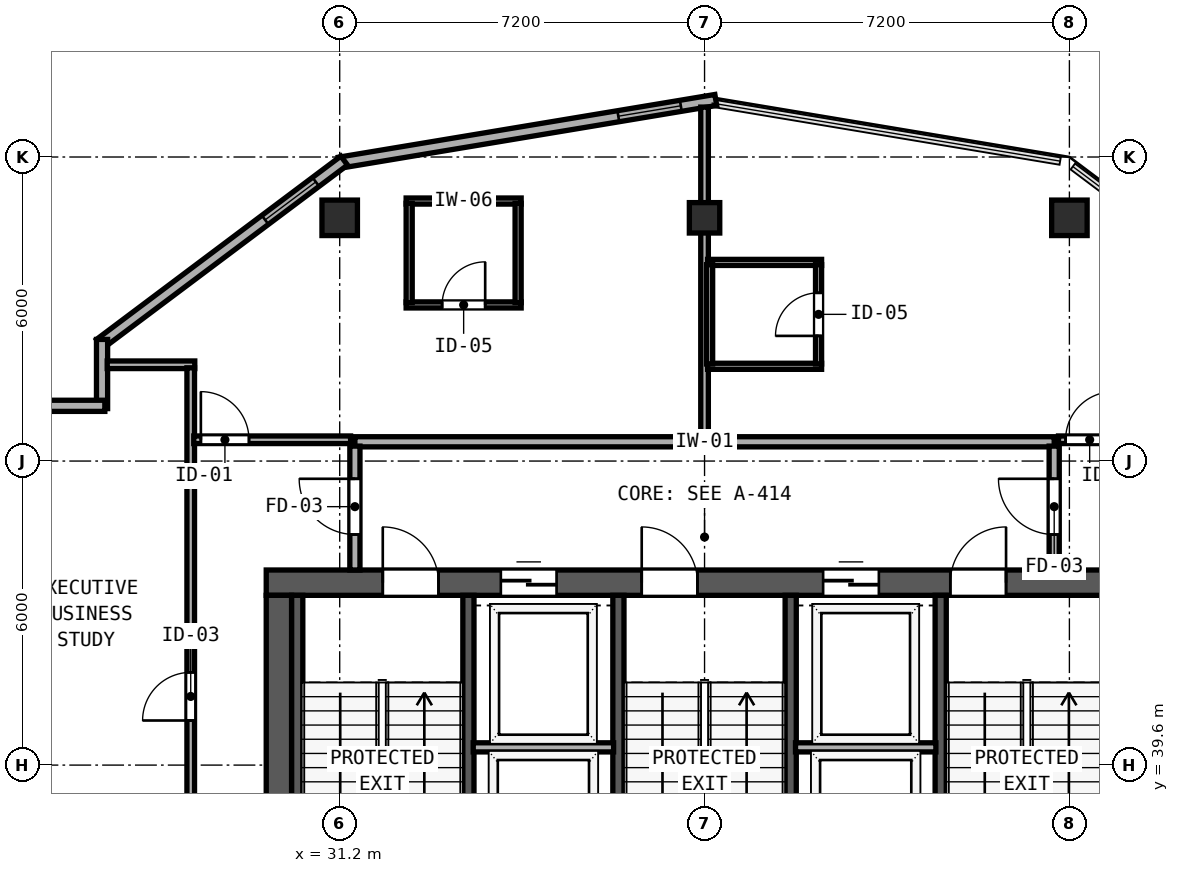
"""IFC4 building model, lengths in metres.
Left out: names, types, materials, properties, quantities, classifications, styles, units other than length and angle.
Written with IfcOpenShell. Run it as: python <this file> out.ifc"""

import sys

from ifc_helpers import new_model, si_unit, direction, frame, frame_2d, origin, origin_2d, place, context, subcontext, project, spatial, rectangle, hollow_rectangle, extrude, element, fill, save


model = new_model("IFC4")
c1 = context("Model", 3, precision=1e-05, world=origin(), true_north=direction((0.0, 1.0)))
c2 = subcontext(c1, "Body", "Model", "MODEL_VIEW")
j1 = project(units=[si_unit("LENGTHUNIT", "METRE"), si_unit("PLANEANGLEUNIT", "RADIAN")], contexts=[c1])
p1 = place(None, origin())
s1 = spatial("IfcSite", under=j1, at=p1, CompositionType="ELEMENT")
p2 = place(p1, origin())
s2 = spatial("IfcBuilding", under=s1, at=p2, CompositionType="ELEMENT")
p3 = place(p2, frame((0.0, 0.0, 301.7)))
s3 = spatial("IfcBuildingStorey", under=s2, at=p3, CompositionType="ELEMENT", Elevation=301.7)
p4 = place(p3, frame((29.75, 43.2, 0.0), z_axis=(0.0, 0.0, 1.0), x_axis=(1.0, 0.0, 0.0)))
e1 = element("IfcWall", 1, at=p4, inside=s3, PredefinedType="SHEAR", context=c2, shape_type="SweptSolid", body=[
    extrude(rectangle(XDim=17.3, YDim=0.5, at=frame_2d((8.65, 0.0))), origin(), (0.0, 0.0, 1.0), 3.72),
])
p5 = place(p4, frame((2.3, 0.0, 0.0)))
e2 = element("IfcOpeningElement", 2, at=p5, cuts=e1, PredefinedType="OPENING", context=c2, shape_type="SweptSolid", body=[
    extrude(rectangle(XDim=1.1, YDim=2.15, at=frame_2d((0.55, 1.075))), frame((0.0, 0.26, 0.0), z_axis=(0.0, -1.0, 0.0), x_axis=(1.0, 0.0, 0.0)), (0.0, 0.0, 1.0), 0.52),
])
p6 = place(p4, frame((7.41, 0.0, 0.0)))
e3 = element("IfcOpeningElement", 3, at=p6, cuts=e1, PredefinedType="OPENING", context=c2, shape_type="SweptSolid", body=[
    extrude(rectangle(XDim=1.1, YDim=2.15, at=frame_2d((0.55, 1.075))), frame((0.0, 0.26, 0.0), z_axis=(0.0, -1.0, 0.0), x_axis=(1.0, 0.0, 0.0)), (0.0, 0.0, 1.0), 0.52),
])
p7 = place(p4, frame((13.5, 0.0, 0.0)))
e4 = element("IfcOpeningElement", 4, at=p7, cuts=e1, PredefinedType="OPENING", context=c2, shape_type="SweptSolid", body=[
    extrude(rectangle(XDim=1.1, YDim=2.15, at=frame_2d((0.55, 1.075))), frame((0.0, 0.26, 0.0), z_axis=(0.0, -1.0, 0.0), x_axis=(1.0, 0.0, 0.0)), (0.0, 0.0, 1.0), 0.52),
])
p8 = place(p4, frame((4.63, 0.0, 0.0)))
e5 = element("IfcOpeningElement", 5, at=p8, cuts=e1, PredefinedType="OPENING", context=c2, shape_type="SweptSolid", body=[
    extrude(rectangle(XDim=1.1, YDim=2.2, at=frame_2d((0.55, 1.1))), frame((0.0, 0.26, 0.0), z_axis=(0.0, -1.0, 0.0), x_axis=(1.0, 0.0, 0.0)), (0.0, 0.0, 1.0), 0.52),
])
p9 = place(p4, frame((10.99, 0.0, 0.0)))
e6 = element("IfcOpeningElement", 6, at=p9, cuts=e1, PredefinedType="OPENING", context=c2, shape_type="SweptSolid", body=[
    extrude(rectangle(XDim=1.1, YDim=2.2, at=frame_2d((0.55, 1.1))), frame((0.0, 0.26, 0.0), z_axis=(0.0, -1.0, 0.0), x_axis=(1.0, 0.0, 0.0)), (0.0, 0.0, 1.0), 0.52),
])
p10 = place(p3, frame((30.0, 32.8, 0.0), z_axis=(0.0, 0.0, 1.0), x_axis=(0.0, 1.0, 0.0)))
e7 = element("IfcWall", 7, at=p10, inside=s3, PredefinedType="SHEAR", context=c2, shape_type="SweptSolid", body=[
    extrude(rectangle(XDim=10.15, YDim=0.5, at=frame_2d((5.075, 0.0))), origin(), (0.0, 0.0, 1.0), 3.72),
])
for number, where, z_axis, x_axis in (
    (8, (30.362, 35.39, 0.0), (0.0, 0.0, 1.0), (0.0, 1.0, 0.0)),
    (9, (33.74, 35.39, 0.0), (0.0, 0.0, 1.0), (0.0, 1.0, 0.0)),
    (10, (36.7, 35.39, 0.0), (0.0, 0.0, 1.0), (0.0, 1.0, 0.0)),
    (11, (40.1, 35.39, 0.0), (0.0, 0.0, 1.0), (0.0, 1.0, 0.0)),
    (12, (43.06, 35.39, 0.0), (0.0, 0.0, 1.0), (0.0, 1.0, 0.0)),
):
    element("IfcWall", number, at=place(p3, frame(where, z_axis=z_axis, x_axis=x_axis)), inside=s3, PredefinedType="SHEAR", context=c2, shape_type="SweptSolid", body=[
        extrude(rectangle(XDim=7.56, YDim=0.22, at=frame_2d((3.78, 0.0))), origin(), (0.0, 0.0, 1.0), 3.72),
    ])
for number, where, z_axis, x_axis in (
    (13, (31.2, 50.4, 0.0), (0.0, 0.0, 1.0), (1.0, 0.0, 0.0)),
    (14, (45.6, 50.4, 0.0), (0.0, 0.0, 1.0), (1.0, 0.0, 0.0)),
):
    element("IfcColumn", number, at=place(p3, frame(where, z_axis=z_axis, x_axis=x_axis)), inside=s3, PredefinedType="COLUMN", context=c2, shape_type="SweptSolid", body=[
        extrude(hollow_rectangle(XDim=0.7, YDim=0.7, WallThickness=0.026, at=origin_2d()), origin(), (0.0, 0.0, 1.0), 3.9),
    ])
p11 = place(p3, frame((38.4, 50.4, 0.0), z_axis=(0.0, 0.0, 1.0), x_axis=(1.0, 0.0, 0.0)))
e15 = element("IfcColumn", 15, at=p11, inside=s3, PredefinedType="COLUMN", context=c2, shape_type="SweptSolid", body=[
    extrude(hollow_rectangle(XDim=0.6, YDim=0.6, WallThickness=0.024, at=origin_2d()), origin(), (0.0, 0.0, 1.0), 3.9),
])
p12 = place(p3, frame((38.622, 52.726, 0.0), z_axis=(0.0, 0.0, 1.0), x_axis=(-0.986390420428, -0.164420006349, 0.0)))
e16 = element("IfcWall", 16, at=p12, inside=s3, PredefinedType="SOLIDWALL", context=c2, shape_type="SweptSolid", body=[
    extrude(rectangle(XDim=7.534, YDim=0.22, at=frame_2d((3.767, 0.0))), origin(), (0.0, 0.0, 1.0), 3.72),
])
p13 = place(p12, frame((0.7, 0.0, 0.85)))
e17 = element("IfcOpeningElement", 17, at=p13, cuts=e16, PredefinedType="OPENING", context=c2, shape_type="SweptSolid", body=[
    extrude(rectangle(XDim=1.25, YDim=1.95, at=frame_2d((0.625, 0.975))), frame((0.0, 0.12, 0.0), z_axis=(0.0, -1.0, 0.0), x_axis=(1.0, 0.0, 0.0)), (0.0, 0.0, 1.0), 0.24),
])
p14 = place(p3, frame((31.289, 51.529, 0.0), z_axis=(0.0, 0.0, 1.0), x_axis=(-0.800014580093, -0.599980559383, 0.0)))
e18 = element("IfcWall", 18, at=p14, inside=s3, PredefinedType="SOLIDWALL", context=c2, shape_type="SweptSolid", body=[
    extrude(rectangle(XDim=6.028, YDim=0.22, at=frame_2d((3.014, 0.0))), origin(), (0.0, 0.0, 1.0), 3.72),
])
p15 = place(p14, frame((0.7, 0.0, 0.85)))
e19 = element("IfcOpeningElement", 19, at=p15, cuts=e18, PredefinedType="OPENING", context=c2, shape_type="SweptSolid", body=[
    extrude(rectangle(XDim=1.25, YDim=1.95, at=frame_2d((0.625, 0.975))), frame((0.0, 0.12, 0.0), z_axis=(0.0, -1.0, 0.0), x_axis=(1.0, 0.0, 0.0)), (0.0, 0.0, 1.0), 0.24),
])
p16 = place(p3, frame((26.51, 48.0, 0.0), z_axis=(0.0, 0.0, 1.0), x_axis=(0.0, -1.0, 0.0)))
e20 = element("IfcWall", 20, at=p16, inside=s3, PredefinedType="SOLIDWALL", context=c2, shape_type="SweptSolid", body=[
    extrude(rectangle(XDim=1.365, YDim=0.22, at=frame_2d((0.683, 0.0))), origin(), (0.0, 0.0, 1.0), 3.72),
])
p17 = place(p3, frame((26.565, 46.69, 0.0), z_axis=(0.0, 0.0, 1.0), x_axis=(-1.0, 0.0, 0.0)))
e21 = element("IfcWall", 21, at=p17, inside=s3, PredefinedType="SOLIDWALL", context=c2, shape_type="SweptSolid", body=[
    extrude(rectangle(XDim=1.31, YDim=0.22, at=frame_2d((0.655, 0.0))), origin(), (0.0, 0.0, 1.0), 3.72),
])
p18 = place(p3, frame((31.5, 45.98, 0.0), z_axis=(0.0, 0.0, 1.0), x_axis=(1.0, 0.0, 0.0)))
e22 = element("IfcWall", 22, at=p18, inside=s3, PredefinedType="SOLIDWALL", context=c2, shape_type="SweptSolid", body=[
    extrude(rectangle(XDim=13.8, YDim=0.2, at=frame_2d((6.9, 0.0))), origin(), (0.0, 0.0, 1.0), 3.72),
])
p19 = place(p3, frame((31.5, 43.45, 0.0), z_axis=(0.0, 0.0, 1.0), x_axis=(0.0, 1.0, 0.0)))
e23 = element("IfcWall", 23, at=p19, inside=s3, PredefinedType="SOLIDWALL", context=c2, shape_type="SweptSolid", body=[
    extrude(rectangle(XDim=2.445, YDim=0.2, at=frame_2d((1.223, 0.0))), origin(), (0.0, 0.0, 1.0), 3.72),
])
p20 = place(p19, frame((1.8, 0.0, 0.0), z_axis=(0.0, 0.0, 1.0), x_axis=(-1.0, 0.0, 0.0)))
e24 = element("IfcOpeningElement", 24, at=p20, cuts=e23, PredefinedType="OPENING", context=c2, shape_type="SweptSolid", body=[
    extrude(rectangle(XDim=1.1, YDim=2.15, at=frame_2d((0.55, 1.075))), frame((0.0, 0.11, 0.0), z_axis=(0.0, -1.0, 0.0), x_axis=(1.0, 0.0, 0.0)), (0.0, 0.0, 1.0), 0.22),
])
p21 = place(p3, frame((45.3, 43.45, 0.0), z_axis=(0.0, 0.0, 1.0), x_axis=(0.0, 1.0, 0.0)))
e25 = element("IfcWall", 25, at=p21, inside=s3, PredefinedType="SOLIDWALL", context=c2, shape_type="SweptSolid", body=[
    extrude(rectangle(XDim=2.445, YDim=0.2, at=frame_2d((1.223, 0.0))), origin(), (0.0, 0.0, 1.0), 3.72),
])
p22 = place(p21, frame((0.7, 0.0, 0.0)))
e26 = element("IfcOpeningElement", 26, at=p22, cuts=e25, PredefinedType="OPENING", context=c2, shape_type="SweptSolid", body=[
    extrude(rectangle(XDim=1.1, YDim=2.15, at=frame_2d((0.55, 1.075))), frame((0.0, 0.11, 0.0), z_axis=(0.0, -1.0, 0.0), x_axis=(1.0, 0.0, 0.0)), (0.0, 0.0, 1.0), 0.22),
])
for number, where, z_axis, x_axis in (
    (27, (33.835, 39.95, 0.0), (0.0, 0.0, 1.0), (1.0, 0.0, 0.0)),
    (28, (40.195, 39.95, 0.0), (0.0, 0.0, 1.0), (1.0, 0.0, 0.0)),
):
    element("IfcWall", number, at=place(p3, frame(where, z_axis=z_axis, x_axis=x_axis)), inside=s3, PredefinedType="SOLIDWALL", context=c2, shape_type="SweptSolid", body=[
        extrude(rectangle(XDim=2.77, YDim=0.18, at=frame_2d((1.385, 0.0))), origin(), (0.0, 0.0, 1.0), 3.72),
    ])
p23 = place(p3, frame((26.612, 47.5, 0.0), z_axis=(0.0, 0.0, 1.0), x_axis=(1.0, 0.0, 0.0)))
e29 = element("IfcWall", 29, at=p23, inside=s3, PredefinedType="PARTITIONING", context=c2, shape_type="SweptSolid", body=[
    extrude(rectangle(XDim=1.728, YDim=0.15, at=frame_2d((0.864, 0.0))), origin(), (0.0, 0.0, 1.0), 3.72),
])
p24 = place(p3, frame((28.26, 38.42, 0.0), z_axis=(0.0, 0.0, 1.0), x_axis=(0.0, 1.0, 0.0)))
e30 = element("IfcWall", 30, at=p24, inside=s3, PredefinedType="PARTITIONING", context=c2, shape_type="SweptSolid", body=[
    extrude(rectangle(XDim=9.02, YDim=0.15, at=frame_2d((4.51, 0.0))), origin(), (0.0, 0.0, 1.0), 3.72),
])
p25 = place(p24, frame((3.01, 0.0, 0.0), z_axis=(0.0, 0.0, 1.0), x_axis=(-1.0, 0.0, 0.0)))
e31 = element("IfcOpeningElement", 31, at=p25, cuts=e30, PredefinedType="OPENING", context=c2, shape_type="SweptSolid", body=[
    extrude(rectangle(XDim=0.95, YDim=2.12, at=frame_2d((0.475, 1.06))), frame((0.0, 0.085, 0.0), z_axis=(0.0, -1.0, 0.0), x_axis=(1.0, 0.0, 0.0)), (0.0, 0.0, 1.0), 0.17),
])
p26 = place(p3, frame((28.32, 46.02, 0.0), z_axis=(0.0, 0.0, 1.0), x_axis=(1.0, 0.0, 0.0)))
e32 = element("IfcWall", 32, at=p26, inside=s3, PredefinedType="PARTITIONING", context=c2, shape_type="SweptSolid", body=[
    extrude(rectangle(XDim=3.095, YDim=0.15, at=frame_2d((1.547, 0.0))), origin(), (0.0, 0.0, 1.0), 3.72),
])
p27 = place(p26, frame((0.14, 0.0, 0.0)))
e33 = element("IfcOpeningElement", 33, at=p27, cuts=e32, PredefinedType="OPENING", context=c2, shape_type="SweptSolid", body=[
    extrude(rectangle(XDim=0.95, YDim=2.18, at=frame_2d((0.475, 1.09))), frame((0.0, 0.085, 0.0), z_axis=(0.0, -1.0, 0.0), x_axis=(1.0, 0.0, 0.0)), (0.0, 0.0, 1.0), 0.17),
])
p28 = place(p3, frame((38.4, 46.065, 0.0), z_axis=(0.0, 0.0, 1.0), x_axis=(0.0, 1.0, 0.0)))
e34 = element("IfcWall", 34, at=p28, inside=s3, PredefinedType="PARTITIONING", context=c2, shape_type="SweptSolid", body=[
    extrude(rectangle(XDim=6.52, YDim=0.15, at=frame_2d((3.26, 0.0))), origin(), (0.0, 0.0, 1.0), 3.72),
])
p29 = place(p3, frame((32.511, 50.731, 0.0), z_axis=(0.0, 0.0, 1.0), x_axis=(1.0, 0.0, 0.0)))
e35 = element("IfcWall", 35, at=p29, inside=s3, PredefinedType="PARTITIONING", context=c2, shape_type="SweptSolid", body=[
    extrude(rectangle(XDim=2.27, YDim=0.12, at=frame_2d((1.135, 0.0))), origin(), (0.0, 0.0, 1.0), 3.72),
])
p30 = place(p3, frame((32.511, 48.681, 0.0), z_axis=(0.0, 0.0, 1.0), x_axis=(1.0, 0.0, 0.0)))
e36 = element("IfcWall", 36, at=p30, inside=s3, PredefinedType="PARTITIONING", context=c2, shape_type="SweptSolid", body=[
    extrude(rectangle(XDim=2.27, YDim=0.12, at=frame_2d((1.135, 0.0))), origin(), (0.0, 0.0, 1.0), 3.72),
])
p31 = place(p30, frame((0.71, 0.0, 0.0)))
e37 = element("IfcOpeningElement", 37, at=p31, cuts=e36, PredefinedType="OPENING", context=c2, shape_type="SweptSolid", body=[
    extrude(rectangle(XDim=0.85, YDim=2.1, at=frame_2d((0.425, 1.05))), frame((0.0, 0.07, 0.0), z_axis=(0.0, -1.0, 0.0), x_axis=(1.0, 0.0, 0.0)), (0.0, 0.0, 1.0), 0.14),
])
for number, where, z_axis, x_axis in (
    (38, (32.571, 48.726, 0.0), (0.0, 0.0, 1.0), (0.0, 1.0, 0.0)),
    (39, (34.721, 48.726, 0.0), (0.0, 0.0, 1.0), (0.0, 1.0, 0.0)),
):
    element("IfcWall", number, at=place(p3, frame(where, z_axis=z_axis, x_axis=x_axis)), inside=s3, PredefinedType="PARTITIONING", context=c2, shape_type="SweptSolid", body=[
        extrude(rectangle(XDim=1.96, YDim=0.12, at=frame_2d((0.98, 0.0))), origin(), (0.0, 0.0, 1.0), 3.72),
    ])
p32 = place(p3, frame((45.385, 46.02, 0.0), z_axis=(0.0, 0.0, 1.0), x_axis=(1.0, 0.0, 0.0)))
e40 = element("IfcWall", 40, at=p32, inside=s3, PredefinedType="PARTITIONING", context=c2, shape_type="SweptSolid", body=[
    extrude(rectangle(XDim=3.095, YDim=0.15, at=frame_2d((1.547, 0.0))), origin(), (0.0, 0.0, 1.0), 3.72),
])
p33 = place(p32, frame((0.14, 0.0, 0.0)))
e41 = element("IfcOpeningElement", 41, at=p33, cuts=e40, PredefinedType="OPENING", context=c2, shape_type="SweptSolid", body=[
    extrude(rectangle(XDim=0.95, YDim=2.18, at=frame_2d((0.475, 1.09))), frame((0.0, 0.085, 0.0), z_axis=(0.0, -1.0, 0.0), x_axis=(1.0, 0.0, 0.0)), (0.0, 0.0, 1.0), 0.17),
])
for number, where, z_axis, x_axis in (
    (42, (38.46, 49.52, 0.0), (0.0, 0.0, 1.0), (1.0, 0.0, 0.0)),
    (43, (38.46, 47.47, 0.0), (0.0, 0.0, 1.0), (1.0, 0.0, 0.0)),
):
    element("IfcWall", number, at=place(p3, frame(where, z_axis=z_axis, x_axis=x_axis)), inside=s3, PredefinedType="PARTITIONING", context=c2, shape_type="SweptSolid", body=[
        extrude(rectangle(XDim=2.25, YDim=0.12, at=frame_2d((1.125, 0.0))), origin(), (0.0, 0.0, 1.0), 3.72),
    ])
p34 = place(p3, frame((38.5, 47.515, 0.0), z_axis=(0.0, 0.0, 1.0), x_axis=(0.0, 1.0, 0.0)))
e44 = element("IfcWall", 44, at=p34, inside=s3, PredefinedType="PARTITIONING", context=c2, shape_type="SweptSolid", body=[
    extrude(rectangle(XDim=1.96, YDim=0.12, at=frame_2d((0.98, 0.0))), origin(), (0.0, 0.0, 1.0), 3.72),
])
p35 = place(p3, frame((40.65, 47.515, 0.0), z_axis=(0.0, 0.0, 1.0), x_axis=(0.0, 1.0, 0.0)))
e45 = element("IfcWall", 45, at=p35, inside=s3, PredefinedType="PARTITIONING", context=c2, shape_type="SweptSolid", body=[
    extrude(rectangle(XDim=1.96, YDim=0.12, at=frame_2d((0.98, 0.0))), origin(), (0.0, 0.0, 1.0), 3.72),
])
p36 = place(p35, frame((0.555, 0.0, 0.0)))
e46 = element("IfcOpeningElement", 46, at=p36, cuts=e45, PredefinedType="OPENING", context=c2, shape_type="SweptSolid", body=[
    extrude(rectangle(XDim=0.85, YDim=2.1, at=frame_2d((0.425, 1.05))), frame((0.0, 0.07, 0.0), z_axis=(0.0, -1.0, 0.0), x_axis=(1.0, 0.0, 0.0)), (0.0, 0.0, 1.0), 0.14),
])
p37 = place(p13, origin())
e47 = element("IfcWindow", 47, at=p37, inside=s3, PartitioningType="SINGLE_PANEL", PredefinedType="WINDOW", context=c2, shape_type="SweptSolid", body=[
    extrude(rectangle(XDim=1.25, YDim=1.95, at=frame_2d((0.625, 0.975))), frame((0.0, 0.03, 0.0), z_axis=(0.0, -1.0, 0.0), x_axis=(1.0, 0.0, 0.0)), (0.0, 0.0, 1.0), 0.06),
])
fill(e17, e47)
p38 = place(p15, origin())
e48 = element("IfcWindow", 48, at=p38, inside=s3, PartitioningType="SINGLE_PANEL", PredefinedType="WINDOW", context=c2, shape_type="SweptSolid", body=[
    extrude(rectangle(XDim=1.25, YDim=1.95, at=frame_2d((0.625, 0.975))), frame((0.0, 0.03, 0.0), z_axis=(0.0, -1.0, 0.0), x_axis=(1.0, 0.0, 0.0)), (0.0, 0.0, 1.0), 0.06),
])
fill(e19, e48)
p39 = place(p5, origin())
e49 = element("IfcDoor", 49, at=p39, inside=s3, OperationType="SINGLE_SWING_LEFT", PredefinedType="DOOR", context=c2, shape_type="SweptSolid", body=[
    extrude(rectangle(XDim=1.1, YDim=2.15, at=frame_2d((0.55, 1.075))), frame((0.0, 0.185, 0.0), z_axis=(0.0, -1.0, 0.0), x_axis=(1.0, 0.0, 0.0)), (0.0, 0.0, 1.0), 0.05),
])
fill(e2, e49)
p40 = place(p6, origin())
e50 = element("IfcDoor", 50, at=p40, inside=s3, OperationType="SINGLE_SWING_LEFT", PredefinedType="DOOR", context=c2, shape_type="SweptSolid", body=[
    extrude(rectangle(XDim=1.1, YDim=2.15, at=frame_2d((0.55, 1.075))), frame((0.0, 0.185, 0.0), z_axis=(0.0, -1.0, 0.0), x_axis=(1.0, 0.0, 0.0)), (0.0, 0.0, 1.0), 0.05),
])
fill(e3, e50)
p41 = place(p7, origin())
e51 = element("IfcDoor", 51, at=p41, inside=s3, OperationType="SINGLE_SWING_RIGHT", PredefinedType="DOOR", context=c2, shape_type="SweptSolid", body=[
    extrude(rectangle(XDim=1.1, YDim=2.15, at=frame_2d((0.55, 1.075))), frame((0.0, 0.185, 0.0), z_axis=(0.0, -1.0, 0.0), x_axis=(1.0, 0.0, 0.0)), (0.0, 0.0, 1.0), 0.05),
])
fill(e4, e51)
p42 = place(p20, origin())
e52 = element("IfcDoor", 52, at=p42, inside=s3, OperationType="SINGLE_SWING_LEFT", PredefinedType="DOOR", context=c2, shape_type="SweptSolid", body=[
    extrude(rectangle(XDim=1.1, YDim=2.15, at=frame_2d((0.55, 1.075))), frame((0.0, 0.025, 0.0), z_axis=(0.0, -1.0, 0.0), x_axis=(1.0, 0.0, 0.0)), (0.0, 0.0, 1.0), 0.05),
])
fill(e24, e52)
p43 = place(p22, origin())
e53 = element("IfcDoor", 53, at=p43, inside=s3, OperationType="SINGLE_SWING_RIGHT", PredefinedType="DOOR", context=c2, shape_type="SweptSolid", body=[
    extrude(rectangle(XDim=1.1, YDim=2.15, at=frame_2d((0.55, 1.075))), frame((0.0, 0.025, 0.0), z_axis=(0.0, -1.0, 0.0), x_axis=(1.0, 0.0, 0.0)), (0.0, 0.0, 1.0), 0.05),
])
fill(e26, e53)
p44 = place(p8, origin())
e54 = element("IfcDoor", 54, at=p44, inside=s3, OperationType="SLIDING_TO_LEFT", PredefinedType="DOOR", context=c2, shape_type="SweptSolid", body=[
    extrude(rectangle(XDim=1.1, YDim=2.2, at=frame_2d((0.55, 1.1))), frame((0.0, 0.185, 0.0), z_axis=(0.0, -1.0, 0.0), x_axis=(1.0, 0.0, 0.0)), (0.0, 0.0, 1.0), 0.05),
])
fill(e5, e54)
p45 = place(p9, origin())
e55 = element("IfcDoor", 55, at=p45, inside=s3, OperationType="SLIDING_TO_LEFT", PredefinedType="DOOR", context=c2, shape_type="SweptSolid", body=[
    extrude(rectangle(XDim=1.1, YDim=2.2, at=frame_2d((0.55, 1.1))), frame((0.0, 0.185, 0.0), z_axis=(0.0, -1.0, 0.0), x_axis=(1.0, 0.0, 0.0)), (0.0, 0.0, 1.0), 0.05),
])
fill(e6, e55)
p46 = place(p25, origin())
e56 = element("IfcDoor", 56, at=p46, inside=s3, OperationType="SINGLE_SWING_RIGHT", PredefinedType="DOOR", context=c2, shape_type="SweptSolid", body=[
    extrude(rectangle(XDim=0.95, YDim=2.12, at=frame_2d((0.475, 1.06))), frame((0.0, 0.025, 0.0), z_axis=(0.0, -1.0, 0.0), x_axis=(1.0, 0.0, 0.0)), (0.0, 0.0, 1.0), 0.05),
])
fill(e31, e56)
p47 = place(p27, origin())
e57 = element("IfcDoor", 57, at=p47, inside=s3, OperationType="SINGLE_SWING_LEFT", PredefinedType="DOOR", context=c2, shape_type="SweptSolid", body=[
    extrude(rectangle(XDim=0.95, YDim=2.18, at=frame_2d((0.475, 1.09))), frame((0.0, 0.025, 0.0), z_axis=(0.0, -1.0, 0.0), x_axis=(1.0, 0.0, 0.0)), (0.0, 0.0, 1.0), 0.05),
])
fill(e33, e57)
p48 = place(p31, origin())
e58 = element("IfcDoor", 58, at=p48, inside=s3, OperationType="SINGLE_SWING_RIGHT", PredefinedType="DOOR", context=c2, shape_type="SweptSolid", body=[
    extrude(rectangle(XDim=0.85, YDim=2.1, at=frame_2d((0.425, 1.05))), frame((0.0, 0.025, 0.0), z_axis=(0.0, -1.0, 0.0), x_axis=(1.0, 0.0, 0.0)), (0.0, 0.0, 1.0), 0.05),
])
fill(e37, e58)
p49 = place(p33, origin())
e59 = element("IfcDoor", 59, at=p49, inside=s3, OperationType="SINGLE_SWING_RIGHT", PredefinedType="DOOR", context=c2, shape_type="SweptSolid", body=[
    extrude(rectangle(XDim=0.95, YDim=2.18, at=frame_2d((0.475, 1.09))), frame((0.0, 0.025, 0.0), z_axis=(0.0, -1.0, 0.0), x_axis=(1.0, 0.0, 0.0)), (0.0, 0.0, 1.0), 0.05),
])
fill(e41, e59)
p50 = place(p36, origin())
e60 = element("IfcDoor", 60, at=p50, inside=s3, OperationType="SINGLE_SWING_LEFT", PredefinedType="DOOR", context=c2, shape_type="SweptSolid", body=[
    extrude(rectangle(XDim=0.85, YDim=2.1, at=frame_2d((0.425, 1.05))), frame((0.0, 0.025, 0.0), z_axis=(0.0, -1.0, 0.0), x_axis=(1.0, 0.0, 0.0)), (0.0, 0.0, 1.0), 0.05),
])
fill(e46, e60)
save(model, sys.argv[1])
